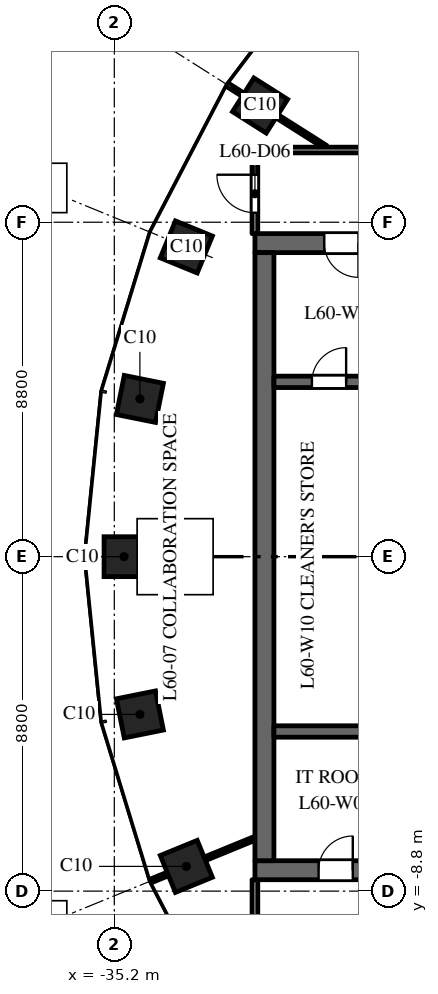
"""IFC4 building model, lengths in metres.
Left out: names, types, materials, properties, quantities, classifications, styles, units other than length and angle.
Written with IfcOpenShell. Run it as: python <this file> out.ifc"""

import sys

from ifc_helpers import new_model, si_unit, direction, frame, frame_2d, origin, origin_2d, place, context, subcontext, project, spatial, rectangle, extrude, element, fill, save


model = new_model("IFC4")
c1 = context("Model", 3, precision=1e-05, world=origin(), true_north=direction((0.0, 1.0)))
c2 = subcontext(c1, "Body", "Model", "MODEL_VIEW")
j1 = project(units=[si_unit("LENGTHUNIT", "METRE"), si_unit("PLANEANGLEUNIT", "RADIAN")], contexts=[c1])
p1 = place(None, origin())
s1 = spatial("IfcSite", under=j1, at=p1, CompositionType="ELEMENT")
p2 = place(p1, origin())
s2 = spatial("IfcBuilding", under=s1, at=p2, CompositionType="ELEMENT")
p3 = place(p2, frame((0.0, 0.0, 281.5)))
s3 = spatial("IfcBuildingStorey", under=s2, at=p3, CompositionType="ELEMENT", Elevation=281.5)
for number, where, z_axis, x_axis in (
    (1, (-31.365, 11.871, 0.0), (0.0, 0.0, 1.0), (-0.535, -0.845, 0.0)),
    (2, (-33.305, 8.149, 0.0), (0.0, 0.0, 1.0), (-0.379, -0.925, 0.0)),
    (3, (-34.527, 4.151, 0.0), (0.0, 0.0, 1.0), (-0.197, -0.98, 0.0)),
    (4, (-34.945, 0.0, 0.0), (0.0, 0.0, 1.0), (0.0, -1.0, 0.0)),
    (5, (-34.527, -4.151, 0.0), (0.0, 0.0, 1.0), (0.197, -0.98, 0.0)),
    (6, (-33.305, -8.149, 0.0), (0.0, 0.0, 1.0), (0.379, -0.925, 0.0)),
):
    element("IfcColumn", number, at=place(p3, frame(where, z_axis=z_axis, x_axis=x_axis)), inside=s3, PredefinedType="COLUMN", context=c2, shape_type="SweptSolid", body=[
        extrude(rectangle(XDim=1.05, YDim=1.05, at=origin_2d()), origin(), (0.0, 0.0, 1.0), 4.0),
    ])
p4 = place(p3, frame((-16.5, 8.25, 0.0), z_axis=(0.0, 0.0, 1.0), x_axis=(-1.0, 0.0, 0.0)))
e7 = element("IfcWall", 7, at=p4, inside=s3, PredefinedType="SHEAR", context=c2, shape_type="SweptSolid", body=[
    extrude(rectangle(XDim=15.0, YDim=0.5, at=frame_2d((7.5, 0.0))), origin(), (0.0, 0.0, 1.0), 3.7),
])
p5 = place(p4, frame((6.9, 0.0, 0.0)))
e8 = element("IfcOpeningElement", 8, at=p5, cuts=e7, PredefinedType="OPENING", context=c2, shape_type="SweptSolid", body=[
    extrude(rectangle(XDim=1.2, YDim=2.1, at=frame_2d((0.6, 1.05))), frame((0.0, 0.26, 0.0), z_axis=(0.0, -1.0, 0.0), x_axis=(1.0, 0.0, 0.0)), (0.0, 0.0, 1.0), 0.52),
])
p6 = place(p4, frame((12.275, 0.0, 0.0)))
e9 = element("IfcOpeningElement", 9, at=p6, cuts=e7, PredefinedType="OPENING", context=c2, shape_type="SweptSolid", body=[
    extrude(rectangle(XDim=0.9, YDim=2.1, at=frame_2d((0.45, 1.05))), frame((0.0, 0.26, 0.0), z_axis=(0.0, -1.0, 0.0), x_axis=(1.0, 0.0, 0.0)), (0.0, 0.0, 1.0), 0.52),
])
p7 = place(p3, frame((-16.5, -8.25, 0.0), z_axis=(0.0, 0.0, 1.0), x_axis=(-1.0, 0.0, 0.0)))
e10 = element("IfcWall", 10, at=p7, inside=s3, PredefinedType="SHEAR", context=c2, shape_type="SweptSolid", body=[
    extrude(rectangle(XDim=15.0, YDim=0.5, at=frame_2d((7.5, 0.0))), origin(), (0.0, 0.0, 1.0), 3.7),
])
p8 = place(p7, frame((6.9, 0.0, 0.0)))
e11 = element("IfcOpeningElement", 11, at=p8, cuts=e10, PredefinedType="OPENING", context=c2, shape_type="SweptSolid", body=[
    extrude(rectangle(XDim=1.2, YDim=2.1, at=frame_2d((0.6, 1.05))), frame((0.0, 0.26, 0.0), z_axis=(0.0, -1.0, 0.0), x_axis=(1.0, 0.0, 0.0)), (0.0, 0.0, 1.0), 0.52),
])
p9 = place(p7, frame((12.425, 0.0, 0.0)))
e12 = element("IfcOpeningElement", 12, at=p9, cuts=e10, PredefinedType="OPENING", context=c2, shape_type="SweptSolid", body=[
    extrude(rectangle(XDim=0.9, YDim=2.1, at=frame_2d((0.45, 1.05))), frame((0.0, 0.26, 0.0), z_axis=(0.0, -1.0, 0.0), x_axis=(1.0, 0.0, 0.0)), (0.0, 0.0, 1.0), 0.52),
])
p10 = place(p3, frame((-31.25, -8.0, 0.0), z_axis=(0.0, 0.0, 1.0), x_axis=(0.0, 1.0, 0.0)))
e13 = element("IfcWall", 13, at=p10, inside=s3, PredefinedType="SHEAR", context=c2, shape_type="SweptSolid", body=[
    extrude(rectangle(XDim=16.0, YDim=0.5, at=frame_2d((8.0, 0.0))), origin(), (0.0, 0.0, 1.0), 3.7),
])
p11 = place(p3, frame((-24.9, 4.6, 0.0), z_axis=(0.0, 0.0, 1.0), x_axis=(-1.0, 0.0, 0.0)))
e14 = element("IfcWall", 14, at=p11, inside=s3, PredefinedType="SHEAR", context=c2, shape_type="SweptSolid", body=[
    extrude(rectangle(XDim=6.1, YDim=0.3, at=frame_2d((3.05, 0.0))), origin(), (0.0, 0.0, 1.0), 3.7),
])
p12 = place(p11, frame((4.2, 0.0, 0.0)))
e15 = element("IfcOpeningElement", 15, at=p12, cuts=e14, PredefinedType="OPENING", context=c2, shape_type="SweptSolid", body=[
    extrude(rectangle(XDim=0.9, YDim=2.1, at=frame_2d((0.45, 1.05))), frame((0.0, 0.16, 0.0), z_axis=(0.0, -1.0, 0.0), x_axis=(1.0, 0.0, 0.0)), (0.0, 0.0, 1.0), 0.32),
])
p13 = place(p3, frame((-24.9, -4.6, 0.0), z_axis=(0.0, 0.0, 1.0), x_axis=(-1.0, 0.0, 0.0)))
e16 = element("IfcWall", 16, at=p13, inside=s3, PredefinedType="SHEAR", context=c2, shape_type="SweptSolid", body=[
    extrude(rectangle(XDim=6.1, YDim=0.3, at=frame_2d((3.05, 0.0))), origin(), (0.0, 0.0, 1.0), 3.7),
])
p14 = place(p3, frame((-34.234, -8.53, 0.0), z_axis=(0.0, 0.0, 1.0), x_axis=(0.925344112436, 0.379128307542, 0.0)))
e17 = element("IfcWall", 17, at=p14, inside=s3, PredefinedType="PARTITIONING", context=c2, shape_type="SweptSolid", body=[
    extrude(rectangle(XDim=2.954, YDim=0.1, at=frame_2d((1.477, 0.0))), origin(), (0.0, 0.0, 1.0), 3.0),
])
p15 = place(p3, frame((-32.212, 12.408, 0.0), z_axis=(0.0, 0.0, 1.0), x_axis=(0.844810627195, -0.535065420467, 0.0)))
e18 = element("IfcWall", 18, at=p15, inside=s3, PredefinedType="PARTITIONING", context=c2, shape_type="SweptSolid", body=[
    extrude(rectangle(XDim=3.048, YDim=0.1, at=frame_2d((1.524, 0.0))), origin(), (0.0, 0.0, 1.0), 3.7),
])
p16 = place(p3, frame((-31.5, -10.7, 0.0), z_axis=(0.0, 0.0, 1.0), x_axis=(0.0, 1.0, 0.0)))
e19 = element("IfcWall", 19, at=p16, inside=s3, PredefinedType="PARTITIONING", context=c2, shape_type="SweptSolid", body=[
    extrude(rectangle(XDim=2.2, YDim=0.15, at=frame_2d((1.1, 0.0))), origin(), (0.0, 0.0, 1.0), 3.7),
])
p17 = place(p3, frame((-31.5, 8.5, 0.0), z_axis=(0.0, 0.0, 1.0), x_axis=(0.0, 1.0, 0.0)))
e20 = element("IfcWall", 20, at=p17, inside=s3, PredefinedType="PARTITIONING", context=c2, shape_type="SweptSolid", body=[
    extrude(rectangle(XDim=2.2, YDim=0.15, at=frame_2d((1.1, 0.0))), origin(), (0.0, 0.0, 1.0), 3.7),
])
p18 = place(p17, frame((0.55, 0.0, 0.0)))
e21 = element("IfcOpeningElement", 21, at=p18, cuts=e20, PredefinedType="OPENING", context=c2, shape_type="SweptSolid", body=[
    extrude(rectangle(XDim=1.0, YDim=2.1, at=frame_2d((0.5, 1.05))), frame((0.0, 0.085, 0.0), z_axis=(0.0, -1.0, 0.0), x_axis=(1.0, 0.0, 0.0)), (0.0, 0.0, 1.0), 0.17),
])
p19 = place(p3, frame((-31.5, 10.7, 0.0), z_axis=(0.0, 0.0, 1.0), x_axis=(1.0, 0.0, 0.0)))
e22 = element("IfcWall", 22, at=p19, inside=s3, PredefinedType="PARTITIONING", context=c2, shape_type="SweptSolid", body=[
    extrude(rectangle(XDim=7.5, YDim=0.15, at=frame_2d((3.75, 0.0))), origin(), (0.0, 0.0, 1.0), 3.1),
])
p20 = place(p6, origin())
e23 = element("IfcDoor", 23, at=p20, inside=s3, OperationType="SINGLE_SWING_RIGHT", PredefinedType="DOOR", context=c2, shape_type="SweptSolid", body=[
    extrude(rectangle(XDim=0.9, YDim=2.1, at=frame_2d((0.45, 1.05))), frame((0.0, 0.025, 0.0), z_axis=(0.0, -1.0, 0.0), x_axis=(1.0, 0.0, 0.0)), (0.0, 0.0, 1.0), 0.05),
])
fill(e9, e23)
p21 = place(p9, origin())
e24 = element("IfcDoor", 24, at=p21, inside=s3, OperationType="SINGLE_SWING_LEFT", PredefinedType="DOOR", context=c2, shape_type="SweptSolid", body=[
    extrude(rectangle(XDim=0.9, YDim=2.1, at=frame_2d((0.45, 1.05))), frame((0.0, 0.025, 0.0), z_axis=(0.0, -1.0, 0.0), x_axis=(1.0, 0.0, 0.0)), (0.0, 0.0, 1.0), 0.05),
])
fill(e12, e24)
p22 = place(p12, origin())
e25 = element("IfcDoor", 25, at=p22, inside=s3, OperationType="SINGLE_SWING_LEFT", PredefinedType="DOOR", context=c2, shape_type="SweptSolid", body=[
    extrude(rectangle(XDim=0.9, YDim=2.1, at=frame_2d((0.45, 1.05))), frame((0.0, 0.025, 0.0), z_axis=(0.0, -1.0, 0.0), x_axis=(1.0, 0.0, 0.0)), (0.0, 0.0, 1.0), 0.05),
])
fill(e15, e25)
p23 = place(p18, origin())
e26 = element("IfcDoor", 26, at=p23, inside=s3, OperationType="SINGLE_SWING_RIGHT", PredefinedType="DOOR", context=c2, shape_type="SweptSolid", body=[
    extrude(rectangle(XDim=1.0, YDim=2.1, at=frame_2d((0.5, 1.05))), frame((0.0, 0.025, 0.0), z_axis=(0.0, -1.0, 0.0), x_axis=(1.0, 0.0, 0.0)), (0.0, 0.0, 1.0), 0.05),
])
fill(e21, e26)
save(model, sys.argv[1])
